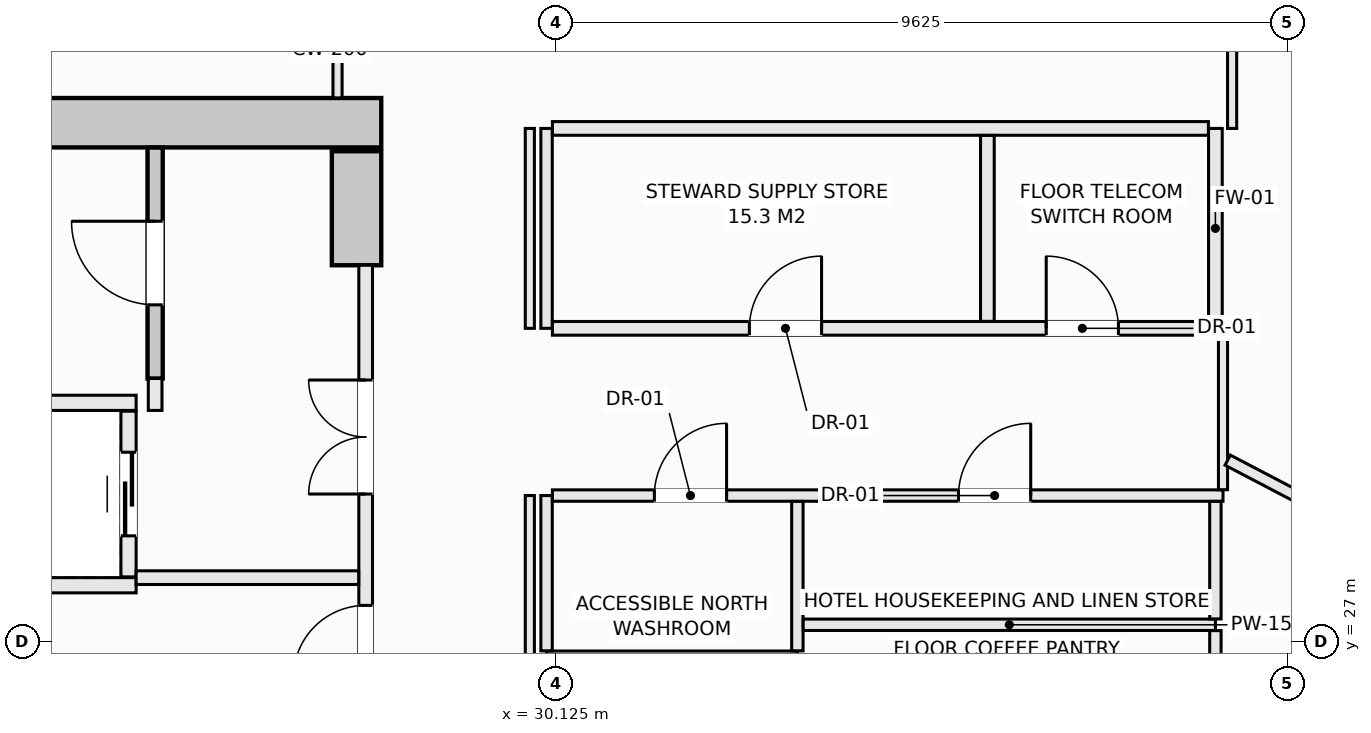
"""IFC4 building model, lengths in metres.
Left out: names, types, materials, properties, quantities, classifications, styles, units other than length and angle.
Written with IfcOpenShell. Run it as: python <this file> out.ifc"""

import sys

from ifc_helpers import new_model, si_unit, direction, frame, frame_2d, origin, place, context, subcontext, project, spatial, rectangle, extrude, element, fill, save


model = new_model("IFC4")
c1 = context("Model", 3, precision=1e-05, world=origin(), true_north=direction((0.0, 1.0)))
c2 = subcontext(c1, "Body", "Model", "MODEL_VIEW")
j1 = project(units=[si_unit("LENGTHUNIT", "METRE"), si_unit("PLANEANGLEUNIT", "RADIAN")], contexts=[c1])
p1 = place(None, origin())
s1 = spatial("IfcSite", under=j1, at=p1, CompositionType="ELEMENT")
p2 = place(p1, origin())
s2 = spatial("IfcBuilding", under=s1, at=p2, CompositionType="ELEMENT")
p3 = place(p2, frame((0.0, 0.0, 156.3)))
s3 = spatial("IfcBuildingStorey", under=s2, at=p3, CompositionType="ELEMENT", Elevation=156.3)
p4 = place(p3, frame((14.175, 33.825, -0.27), z_axis=(0.0, 0.0, 1.0), x_axis=(1.0, 0.0, 0.0)))
e1 = element("IfcWall", 1, at=p4, inside=s3, PredefinedType="SHEAR", context=c2, shape_type="SweptSolid", body=[
    extrude(rectangle(XDim=13.65, YDim=0.65, at=frame_2d((6.825, 0.0))), origin(), (0.0, 0.0, 1.0), 3.4),
])
p5 = place(p3, frame((27.5, 31.95, -0.27), z_axis=(0.0, 0.0, 1.0), x_axis=(0.0, 1.0, 0.0)))
e2 = element("IfcWall", 2, at=p5, inside=s3, PredefinedType="SHEAR", context=c2, shape_type="SweptSolid", body=[
    extrude(rectangle(XDim=1.5, YDim=0.65, at=frame_2d((0.75, 0.0))), origin(), (0.0, 0.0, 1.0), 3.4),
])
p6 = place(p3, frame((24.85, 30.46, -0.27), z_axis=(0.0, 0.0, 1.0), x_axis=(0.0, 1.0, 0.0)))
e3 = element("IfcWall", 3, at=p6, inside=s3, PredefinedType="SHEAR", context=c2, shape_type="SweptSolid", body=[
    extrude(rectangle(XDim=3.038, YDim=0.2, at=frame_2d((1.519, 0.0))), origin(), (0.0, 0.0, 1.0), 3.4),
])
p7 = place(p6, frame((0.969, 0.0, 0.27)))
e4 = element("IfcOpeningElement", 4, at=p7, cuts=e3, PredefinedType="OPENING", context=c2, shape_type="SweptSolid", body=[
    extrude(rectangle(XDim=1.1, YDim=2.15, at=frame_2d((0.55, 1.075))), frame((0.0, 0.11, 0.0), z_axis=(0.0, -1.0, 0.0), x_axis=(1.0, 0.0, 0.0)), (0.0, 0.0, 1.0), 0.22),
])
for number, where, z_axis, x_axis in (
    (5, (22.15, 30.14, 0.0), (0.0, 0.0, 1.0), (1.0, 0.0, 0.0)),
    (6, (22.15, 27.74, 0.0), (0.0, 0.0, 1.0), (1.0, 0.0, 0.0)),
):
    element("IfcWall", number, at=place(p3, frame(where, z_axis=z_axis, x_axis=x_axis)), inside=s3, PredefinedType="SOLIDWALL", context=c2, shape_type="SweptSolid", body=[
        extrude(rectangle(XDim=2.45, YDim=0.2, at=frame_2d((1.225, 0.0))), origin(), (0.0, 0.0, 1.0), 3.13),
    ])
p8 = place(p3, frame((24.5, 27.85, 0.0), z_axis=(0.0, 0.0, 1.0), x_axis=(0.0, 1.0, 0.0)))
e7 = element("IfcWall", 7, at=p8, inside=s3, PredefinedType="SOLIDWALL", context=c2, shape_type="SweptSolid", body=[
    extrude(rectangle(XDim=2.18, YDim=0.2, at=frame_2d((1.09, 0.0))), origin(), (0.0, 0.0, 1.0), 3.13),
])
p9 = place(p8, frame((0.54, 0.0, 0.0)))
e8 = element("IfcOpeningElement", 8, at=p9, cuts=e7, PredefinedType="OPENING", context=c2, shape_type="SweptSolid", body=[
    extrude(rectangle(XDim=1.1, YDim=2.2, at=frame_2d((0.55, 1.1))), frame((0.0, 0.11, 0.0), z_axis=(0.0, -1.0, 0.0), x_axis=(1.0, 0.0, 0.0)), (0.0, 0.0, 1.0), 0.22),
])
p10 = place(p3, frame((24.85, 30.04, 0.0), z_axis=(0.0, 0.0, 1.0), x_axis=(0.0, 1.0, 0.0)))
e9 = element("IfcWall", 9, at=p10, inside=s3, PredefinedType="SOLIDWALL", context=c2, shape_type="SweptSolid", body=[
    extrude(rectangle(XDim=0.42, YDim=0.18, at=frame_2d((0.21, 0.0))), origin(), (0.0, 0.0, 1.0), 3.13),
])
p11 = place(p3, frame((27.62, 22.05, 0.0), z_axis=(0.0, 0.0, 1.0), x_axis=(0.0, 1.0, 0.0)))
e10 = element("IfcWall", 10, at=p11, inside=s3, PredefinedType="SOLIDWALL", context=c2, shape_type="SweptSolid", body=[
    extrude(rectangle(XDim=9.9, YDim=0.18, at=frame_2d((4.95, 0.0))), origin(), (0.0, 0.0, 1.0), 3.13),
])
p12 = place(p11, frame((4.475, 0.0, 0.0)))
e11 = element("IfcOpeningElement", 11, at=p12, cuts=e10, PredefinedType="OPENING", context=c2, shape_type="SweptSolid", body=[
    extrude(rectangle(XDim=0.95, YDim=2.1, at=frame_2d((0.475, 1.05))), frame((0.0, 0.1, 0.0), z_axis=(0.0, -1.0, 0.0), x_axis=(1.0, 0.0, 0.0)), (0.0, 0.0, 1.0), 0.2),
])
p13 = place(p11, frame((6.89, 0.0, 0.0)))
e12 = element("IfcOpeningElement", 12, at=p13, cuts=e10, PredefinedType="OPENING", context=c2, shape_type="SweptSolid", body=[
    extrude(rectangle(XDim=1.5, YDim=2.2, at=frame_2d((0.75, 1.1))), frame((0.0, 0.1, 0.0), z_axis=(0.0, -1.0, 0.0), x_axis=(1.0, 0.0, 0.0)), (0.0, 0.0, 1.0), 0.2),
])
p14 = place(p11, frame((1.51, 0.0, 0.0)))
e13 = element("IfcOpeningElement", 13, at=p14, cuts=e10, PredefinedType="OPENING", context=c2, shape_type="SweptSolid", body=[
    extrude(rectangle(XDim=1.5, YDim=2.2, at=frame_2d((0.75, 1.1))), frame((0.0, 0.1, 0.0), z_axis=(0.0, -1.0, 0.0), x_axis=(1.0, 0.0, 0.0)), (0.0, 0.0, 1.0), 0.2),
])
p15 = place(p3, frame((24.6, 27.84, 0.0), z_axis=(0.0, 0.0, 1.0), x_axis=(1.0, 0.0, 0.0)))
e14 = element("IfcWall", 14, at=p15, inside=s3, PredefinedType="SOLIDWALL", context=c2, shape_type="SweptSolid", body=[
    extrude(rectangle(XDim=2.928, YDim=0.18, at=frame_2d((1.464, 0.0))), origin(), (0.0, 0.0, 1.0), 3.13),
])
p16 = place(p3, frame((30.0, 26.8, 0.0), z_axis=(0.0, 0.0, 1.0), x_axis=(1.0, 0.0, 0.0)))
e15 = element("IfcWall", 15, at=p16, inside=s3, PredefinedType="PARTITIONING", context=c2, shape_type="SweptSolid", body=[
    extrude(rectangle(XDim=3.3, YDim=0.15, at=frame_2d((1.65, 0.0))), origin(), (0.0, 0.0, 1.0), 3.13),
])
p17 = place(p3, frame((30.0, 26.877, 0.0), z_axis=(0.0, 0.0, 1.0), x_axis=(0.0, 1.0, 0.0)))
e16 = element("IfcWall", 16, at=p17, inside=s3, PredefinedType="PARTITIONING", context=c2, shape_type="SweptSolid", body=[
    extrude(rectangle(XDim=2.043, YDim=0.15, at=frame_2d((1.021, 0.0))), origin(), (0.0, 0.0, 1.0), 3.13),
])
p18 = place(p3, frame((30.0, 31.12, 0.0), z_axis=(0.0, 0.0, 1.0), x_axis=(0.0, 1.0, 0.0)))
e17 = element("IfcWall", 17, at=p18, inside=s3, PredefinedType="PARTITIONING", context=c2, shape_type="SweptSolid", body=[
    extrude(rectangle(XDim=2.63, YDim=0.15, at=frame_2d((1.315, 0.0))), origin(), (0.0, 0.0, 1.0), 3.13),
])
p19 = place(p3, frame((30.077, 28.92, 0.0), z_axis=(0.0, 0.0, 1.0), x_axis=(1.0, 0.0, 0.0)))
e18 = element("IfcWall", 18, at=p19, inside=s3, PredefinedType="PARTITIONING", context=c2, shape_type="SweptSolid", body=[
    extrude(rectangle(XDim=8.823, YDim=0.15, at=frame_2d((4.412, 0.0))), origin(), (0.0, 0.0, 1.0), 3.13),
])
p20 = place(p19, frame((1.342, 0.0, 0.0)))
e19 = element("IfcOpeningElement", 19, at=p20, cuts=e18, PredefinedType="OPENING", context=c2, shape_type="SweptSolid", body=[
    extrude(rectangle(XDim=0.95, YDim=2.1, at=frame_2d((0.475, 1.05))), frame((0.0, 0.085, 0.0), z_axis=(0.0, -1.0, 0.0), x_axis=(1.0, 0.0, 0.0)), (0.0, 0.0, 1.0), 0.17),
])
p21 = place(p19, frame((5.343, 0.0, 0.0)))
e20 = element("IfcOpeningElement", 20, at=p21, cuts=e18, PredefinedType="OPENING", context=c2, shape_type="SweptSolid", body=[
    extrude(rectangle(XDim=0.95, YDim=2.1, at=frame_2d((0.475, 1.05))), frame((0.0, 0.085, 0.0), z_axis=(0.0, -1.0, 0.0), x_axis=(1.0, 0.0, 0.0)), (0.0, 0.0, 1.0), 0.17),
])
p22 = place(p3, frame((33.3, 26.877, 0.0), z_axis=(0.0, 0.0, 1.0), x_axis=(0.0, 1.0, 0.0)))
e21 = element("IfcWall", 21, at=p22, inside=s3, PredefinedType="PARTITIONING", context=c2, shape_type="SweptSolid", body=[
    extrude(rectangle(XDim=1.966, YDim=0.15, at=frame_2d((0.983, 0.0))), origin(), (0.0, 0.0, 1.0), 3.13),
])
p23 = place(p3, frame((33.377, 27.22, 0.0), z_axis=(0.0, 0.0, 1.0), x_axis=(1.0, 0.0, 0.0)))
e22 = element("IfcWall", 22, at=p23, inside=s3, PredefinedType="PARTITIONING", context=c2, shape_type="SweptSolid", body=[
    extrude(rectangle(XDim=5.423, YDim=0.15, at=frame_2d((2.711, 0.0))), origin(), (0.0, 0.0, 1.0), 3.13),
])
p24 = place(p3, frame((38.8, 25.197, 0.0), z_axis=(0.0, 0.0, 1.0), x_axis=(0.0, 1.0, 0.0)))
e23 = element("IfcWall", 23, at=p24, inside=s3, PredefinedType="PARTITIONING", context=c2, shape_type="SweptSolid", body=[
    extrude(rectangle(XDim=1.946, YDim=0.15, at=frame_2d((0.973, 0.0))), origin(), (0.0, 0.0, 1.0), 3.13),
])
p25 = place(p3, frame((38.8, 27.297, 0.0), z_axis=(0.0, 0.0, 1.0), x_axis=(0.0, 1.0, 0.0)))
e24 = element("IfcWall", 24, at=p25, inside=s3, PredefinedType="PARTITIONING", context=c2, shape_type="SweptSolid", body=[
    extrude(rectangle(XDim=1.546, YDim=0.15, at=frame_2d((0.773, 0.0))), origin(), (0.0, 0.0, 1.0), 3.13),
])
p26 = place(p3, frame((38.8, 31.12, 0.0), z_axis=(0.0, 0.0, 1.0), x_axis=(0.0, 1.0, 0.0)))
e25 = element("IfcWall", 25, at=p26, inside=s3, PredefinedType="SOLIDWALL", context=c2, shape_type="SweptSolid", body=[
    extrude(rectangle(XDim=2.63, YDim=0.18, at=frame_2d((1.315, 0.0))), origin(), (0.0, 0.0, 1.0), 3.13),
])
p27 = place(p3, frame((30.077, 31.12, 0.0), z_axis=(0.0, 0.0, 1.0), x_axis=(1.0, 0.0, 0.0)))
e26 = element("IfcWall", 26, at=p27, inside=s3, PredefinedType="SOLIDWALL", context=c2, shape_type="SweptSolid", body=[
    extrude(rectangle(XDim=8.631, YDim=0.18, at=frame_2d((4.315, 0.0))), origin(), (0.0, 0.0, 1.0), 3.13),
])
p28 = place(p27, frame((2.592, 0.0, 0.0)))
e27 = element("IfcOpeningElement", 27, at=p28, cuts=e26, PredefinedType="OPENING", context=c2, shape_type="SweptSolid", body=[
    extrude(rectangle(XDim=0.95, YDim=2.1, at=frame_2d((0.475, 1.05))), frame((0.0, 0.1, 0.0), z_axis=(0.0, -1.0, 0.0), x_axis=(1.0, 0.0, 0.0)), (0.0, 0.0, 1.0), 0.2),
])
p29 = place(p27, frame((6.497, 0.0, 0.0)))
e28 = element("IfcOpeningElement", 28, at=p29, cuts=e26, PredefinedType="OPENING", context=c2, shape_type="SweptSolid", body=[
    extrude(rectangle(XDim=0.95, YDim=2.1, at=frame_2d((0.475, 1.05))), frame((0.0, 0.1, 0.0), z_axis=(0.0, -1.0, 0.0), x_axis=(1.0, 0.0, 0.0)), (0.0, 0.0, 1.0), 0.2),
])
p30 = place(p3, frame((30.077, 33.75, 0.0), z_axis=(0.0, 0.0, 1.0), x_axis=(1.0, 0.0, 0.0)))
e29 = element("IfcWall", 29, at=p30, inside=s3, PredefinedType="SOLIDWALL", context=c2, shape_type="SweptSolid", body=[
    extrude(rectangle(XDim=8.631, YDim=0.18, at=frame_2d((4.315, 0.0))), origin(), (0.0, 0.0, 1.0), 3.13),
])
p31 = place(p3, frame((35.8, 31.212, 0.0), z_axis=(0.0, 0.0, 1.0), x_axis=(0.0, 1.0, 0.0)))
e30 = element("IfcWall", 30, at=p31, inside=s3, PredefinedType="SOLIDWALL", context=c2, shape_type="SweptSolid", body=[
    extrude(rectangle(XDim=2.446, YDim=0.18, at=frame_2d((1.223, 0.0))), origin(), (0.0, 0.0, 1.0), 3.13),
])
p32 = place(p3, frame((39.02, 33.75, 0.0), z_axis=(0.0, 0.0, 1.0), x_axis=(0.0, 1.0, 0.0)))
e31 = element("IfcWall", 31, at=p32, inside=s3, PredefinedType="PARTITIONING", context=c2, shape_type="SweptSolid", body=[
    extrude(rectangle(XDim=2.0, YDim=0.12, at=frame_2d((1.0, 0.0))), origin(), (0.0, 0.0, 1.0), 3.13),
])
p33 = place(p3, frame((27.25, 34.152, 0.0), z_axis=(0.0, 0.0, 1.0), x_axis=(0.0, 1.0, 0.0)))
e32 = element("IfcWall", 32, at=p33, inside=s3, PredefinedType="PARTITIONING", context=c2, shape_type="SweptSolid", body=[
    extrude(rectangle(XDim=0.806, YDim=0.12, at=frame_2d((0.403, 0.0))), origin(), (0.0, 0.0, 1.0), 3.13),
])
p34 = place(p3, frame((29.78, 25.12, 0.0), z_axis=(0.0, 0.0, 1.0), x_axis=(0.0, 1.0, 0.0)))
e33 = element("IfcWall", 33, at=p34, inside=s3, PredefinedType="PARTITIONING", context=c2, shape_type="SweptSolid", body=[
    extrude(rectangle(XDim=3.8, YDim=0.12, at=frame_2d((1.9, 0.0))), origin(), (0.0, 0.0, 1.0), 3.13),
])
p35 = place(p3, frame((29.78, 31.12, 0.0), z_axis=(0.0, 0.0, 1.0), x_axis=(0.0, 1.0, 0.0)))
e34 = element("IfcWall", 34, at=p35, inside=s3, PredefinedType="PARTITIONING", context=c2, shape_type="SweptSolid", body=[
    extrude(rectangle(XDim=2.63, YDim=0.12, at=frame_2d((1.315, 0.0))), origin(), (0.0, 0.0, 1.0), 3.13),
])
p36 = place(p3, frame((38.9, 28.997, 0.0), z_axis=(0.0, 0.0, 1.0), x_axis=(0.0, 1.0, 0.0)))
e35 = element("IfcWall", 35, at=p36, inside=s3, PredefinedType="PARTITIONING", context=c2, shape_type="SweptSolid", body=[
    extrude(rectangle(XDim=2.123, YDim=0.12, at=frame_2d((1.062, 0.0))), origin(), (0.0, 0.0, 1.0), 3.13),
])
p37 = place(p3, frame((38.962, 29.386, 0.0), z_axis=(0.0, 0.0, 1.0), x_axis=(0.885905291329, -0.463866160434, 0.0)))
e36 = element("IfcWall", 36, at=p37, inside=s3, PredefinedType="PARTITIONING", context=c2, shape_type="SweptSolid", body=[
    extrude(rectangle(XDim=13.863, YDim=0.15, at=frame_2d((6.931, 0.0))), origin(), (0.0, 0.0, 1.0), 2.505),
])
p38 = place(p7, origin())
e37 = element("IfcDoor", 37, at=p38, inside=s3, OperationType="SINGLE_SWING_RIGHT", PredefinedType="DOOR", context=c2, shape_type="SweptSolid", body=[
    extrude(rectangle(XDim=1.1, YDim=2.15, at=frame_2d((0.55, 1.075))), frame((0.0, 0.025, 0.0), z_axis=(0.0, -1.0, 0.0), x_axis=(1.0, 0.0, 0.0)), (0.0, 0.0, 1.0), 0.05),
])
fill(e4, e37)
p39 = place(p9, origin())
e38 = element("IfcDoor", 38, at=p39, inside=s3, OperationType="SLIDING_TO_LEFT", PredefinedType="DOOR", context=c2, shape_type="SweptSolid", body=[
    extrude(rectangle(XDim=1.1, YDim=2.2, at=frame_2d((0.55, 1.1))), frame((0.0, 0.025, 0.0), z_axis=(0.0, -1.0, 0.0), x_axis=(1.0, 0.0, 0.0)), (0.0, 0.0, 1.0), 0.05),
])
fill(e8, e38)
p40 = place(p12, origin())
e39 = element("IfcDoor", 39, at=p40, inside=s3, OperationType="SINGLE_SWING_LEFT", PredefinedType="DOOR", context=c2, shape_type="SweptSolid", body=[
    extrude(rectangle(XDim=0.95, YDim=2.1, at=frame_2d((0.475, 1.05))), frame((0.0, 0.025, 0.0), z_axis=(0.0, -1.0, 0.0), x_axis=(1.0, 0.0, 0.0)), (0.0, 0.0, 1.0), 0.05),
])
fill(e11, e39)
p41 = place(p13, origin())
e40 = element("IfcDoor", 40, at=p41, inside=s3, OperationType="DOUBLE_DOOR_SINGLE_SWING", PredefinedType="DOOR", context=c2, shape_type="SweptSolid", body=[
    extrude(rectangle(XDim=1.5, YDim=2.2, at=frame_2d((0.75, 1.1))), frame((0.0, 0.025, 0.0), z_axis=(0.0, -1.0, 0.0), x_axis=(1.0, 0.0, 0.0)), (0.0, 0.0, 1.0), 0.05),
])
fill(e12, e40)
p42 = place(p20, origin())
e41 = element("IfcDoor", 41, at=p42, inside=s3, OperationType="SINGLE_SWING_RIGHT", PredefinedType="DOOR", context=c2, shape_type="SweptSolid", body=[
    extrude(rectangle(XDim=0.95, YDim=2.1, at=frame_2d((0.475, 1.05))), frame((0.0, 0.025, 0.0), z_axis=(0.0, -1.0, 0.0), x_axis=(1.0, 0.0, 0.0)), (0.0, 0.0, 1.0), 0.05),
])
fill(e19, e41)
p43 = place(p21, origin())
e42 = element("IfcDoor", 42, at=p43, inside=s3, OperationType="SINGLE_SWING_RIGHT", PredefinedType="DOOR", context=c2, shape_type="SweptSolid", body=[
    extrude(rectangle(XDim=0.95, YDim=2.1, at=frame_2d((0.475, 1.05))), frame((0.0, 0.025, 0.0), z_axis=(0.0, -1.0, 0.0), x_axis=(1.0, 0.0, 0.0)), (0.0, 0.0, 1.0), 0.05),
])
fill(e20, e42)
p44 = place(p28, origin())
e43 = element("IfcDoor", 43, at=p44, inside=s3, OperationType="SINGLE_SWING_RIGHT", PredefinedType="DOOR", context=c2, shape_type="SweptSolid", body=[
    extrude(rectangle(XDim=0.95, YDim=2.1, at=frame_2d((0.475, 1.05))), frame((0.0, 0.025, 0.0), z_axis=(0.0, -1.0, 0.0), x_axis=(1.0, 0.0, 0.0)), (0.0, 0.0, 1.0), 0.05),
])
fill(e27, e43)
p45 = place(p29, origin())
e44 = element("IfcDoor", 44, at=p45, inside=s3, OperationType="SINGLE_SWING_LEFT", PredefinedType="DOOR", context=c2, shape_type="SweptSolid", body=[
    extrude(rectangle(XDim=0.95, YDim=2.1, at=frame_2d((0.475, 1.05))), frame((0.0, 0.025, 0.0), z_axis=(0.0, -1.0, 0.0), x_axis=(1.0, 0.0, 0.0)), (0.0, 0.0, 1.0), 0.05),
])
fill(e28, e44)
save(model, sys.argv[1])
